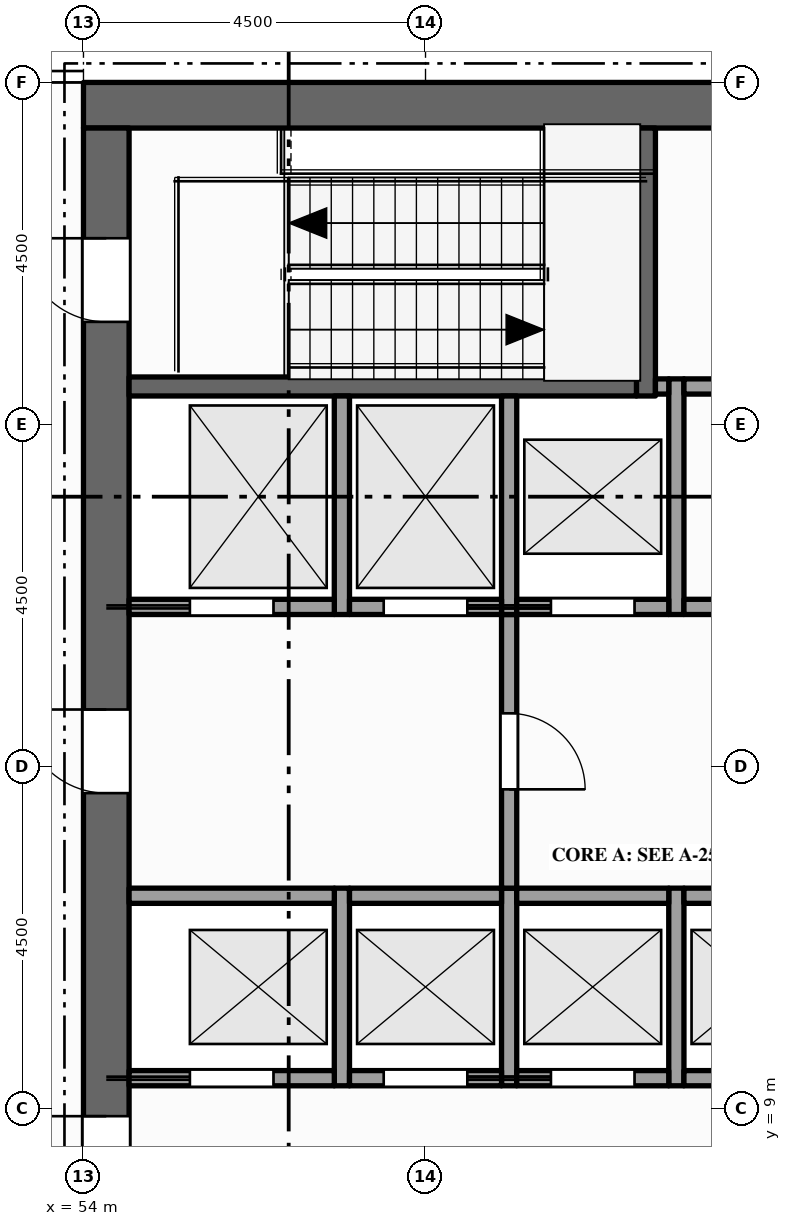
"""IFC4 building model, lengths in metres.
Left out: names, types, materials, properties, quantities, classifications, styles, units other than length and angle.
Written with IfcOpenShell. Run it as: python <this file> out.ifc"""

import sys

from ifc_helpers import new_model, si_unit, direction, frame, frame_2d, origin, place, context, subcontext, project, spatial, rectangle, extrude, element, fill, save


model = new_model("IFC4")
c1 = context("Model", 3, precision=1e-05, world=origin(), true_north=direction((0.0, 1.0)))
c2 = subcontext(c1, "Body", "Model", "MODEL_VIEW")
j1 = project(units=[si_unit("LENGTHUNIT", "METRE"), si_unit("PLANEANGLEUNIT", "RADIAN")], contexts=[c1])
p1 = place(None, origin())
s1 = spatial("IfcSite", under=j1, at=p1, CompositionType="ELEMENT")
p2 = place(p1, origin())
s2 = spatial("IfcBuilding", under=s1, at=p2, CompositionType="ELEMENT")
p3 = place(p2, frame((0.0, 0.0, 323.0)))
s3 = spatial("IfcBuildingStorey", under=s2, at=p3, CompositionType="ELEMENT", Elevation=323.0)
p4 = place(p3, frame((54.0, 22.2, -0.15), z_axis=(0.0, 0.0, 1.0), x_axis=(1.0, 0.0, 0.0)))
e1 = element("IfcWall", 1, at=p4, inside=s3, PredefinedType="SHEAR", context=c2, shape_type="SweptSolid", body=[
    extrude(rectangle(XDim=13.5, YDim=0.6, at=frame_2d((6.75, 0.0))), origin(), (0.0, 0.0, 1.0), 4.5),
])
p5 = place(p3, frame((54.3, 0.6, -0.15), z_axis=(0.0, 0.0, 1.0), x_axis=(0.0, 1.0, 0.0)))
e2 = element("IfcWall", 2, at=p5, inside=s3, PredefinedType="SHEAR", context=c2, shape_type="SweptSolid", body=[
    extrude(rectangle(XDim=21.3, YDim=0.6, at=frame_2d((10.65, 0.0))), origin(), (0.0, 0.0, 1.0), 4.5),
])
p6 = place(p5, frame((6.5, 0.0, 0.15)))
e3 = element("IfcOpeningElement", 3, at=p6, cuts=e2, PredefinedType="OPENING", context=c2, shape_type="SweptSolid", body=[
    extrude(rectangle(XDim=1.8, YDim=2.1, at=frame_2d((0.9, 1.05))), frame((0.0, 0.31, 0.0), z_axis=(0.0, -1.0, 0.0), x_axis=(1.0, 0.0, 0.0)), (0.0, 0.0, 1.0), 0.62),
])
p7 = place(p5, frame((12.55, 0.0, 0.15)))
e4 = element("IfcOpeningElement", 4, at=p7, cuts=e2, PredefinedType="OPENING", context=c2, shape_type="SweptSolid", body=[
    extrude(rectangle(XDim=1.1, YDim=2.1, at=frame_2d((0.55, 1.05))), frame((0.0, 0.31, 0.0), z_axis=(0.0, -1.0, 0.0), x_axis=(1.0, 0.0, 0.0)), (0.0, 0.0, 1.0), 0.62),
])
p8 = place(p5, frame((1.55, 0.0, 0.15)))
e5 = element("IfcOpeningElement", 5, at=p8, cuts=e2, PredefinedType="OPENING", context=c2, shape_type="SweptSolid", body=[
    extrude(rectangle(XDim=1.1, YDim=2.1, at=frame_2d((0.55, 1.05))), frame((0.0, 0.31, 0.0), z_axis=(0.0, -1.0, 0.0), x_axis=(1.0, 0.0, 0.0)), (0.0, 0.0, 1.0), 0.62),
])
p9 = place(p5, frame((18.75, 0.0, 0.15)))
e6 = element("IfcOpeningElement", 6, at=p9, cuts=e2, PredefinedType="OPENING", context=c2, shape_type="SweptSolid", body=[
    extrude(rectangle(XDim=1.1, YDim=2.1, at=frame_2d((0.55, 1.05))), frame((0.0, 0.31, 0.0), z_axis=(0.0, -1.0, 0.0), x_axis=(1.0, 0.0, 0.0)), (0.0, 0.0, 1.0), 0.62),
])
p10 = place(p3, frame((57.4, 9.3, 0.0), z_axis=(0.0, 0.0, 1.0), x_axis=(0.0, 1.0, 0.0)))
e7 = element("IfcWall", 7, at=p10, inside=s3, PredefinedType="SOLIDWALL", context=c2, shape_type="SweptSolid", body=[
    extrude(rectangle(XDim=2.6, YDim=0.2, at=frame_2d((1.3, 0.0))), origin(), (0.0, 0.0, 1.0), 4.35),
])
p11 = place(p3, frame((57.4, 15.5, 0.0), z_axis=(0.0, 0.0, 1.0), x_axis=(0.0, 1.0, 0.0)))
e8 = element("IfcWall", 8, at=p11, inside=s3, PredefinedType="SOLIDWALL", context=c2, shape_type="SweptSolid", body=[
    extrude(rectangle(XDim=2.875, YDim=0.2, at=frame_2d((1.438, 0.0))), origin(), (0.0, 0.0, 1.0), 4.35),
])
p12 = place(p3, frame((59.6, 9.3, 0.0), z_axis=(0.0, 0.0, 1.0), x_axis=(0.0, 1.0, 0.0)))
e9 = element("IfcWall", 9, at=p12, inside=s3, PredefinedType="SOLIDWALL", context=c2, shape_type="SweptSolid", body=[
    extrude(rectangle(XDim=2.6, YDim=0.2, at=frame_2d((1.3, 0.0))), origin(), (0.0, 0.0, 1.0), 4.35),
])
p13 = place(p3, frame((59.6, 11.9, 0.0), z_axis=(0.0, 0.0, 1.0), x_axis=(0.0, 1.0, 0.0)))
e10 = element("IfcWall", 10, at=p13, inside=s3, PredefinedType="PARTITIONING", context=c2, shape_type="SweptSolid", body=[
    extrude(rectangle(XDim=3.6, YDim=0.2, at=frame_2d((1.8, 0.0))), origin(), (0.0, 0.0, 1.0), 4.35),
])
p14 = place(p13, frame((1.3, 0.0, 0.0)))
e11 = element("IfcOpeningElement", 11, at=p14, cuts=e10, PredefinedType="OPENING", context=c2, shape_type="SweptSolid", body=[
    extrude(rectangle(XDim=1.0, YDim=2.1, at=frame_2d((0.5, 1.05))), frame((0.0, 0.11, 0.0), z_axis=(0.0, -1.0, 0.0), x_axis=(1.0, 0.0, 0.0)), (0.0, 0.0, 1.0), 0.22),
])
p15 = place(p3, frame((59.6, 15.5, 0.0), z_axis=(0.0, 0.0, 1.0), x_axis=(0.0, 1.0, 0.0)))
e12 = element("IfcWall", 12, at=p15, inside=s3, PredefinedType="SOLIDWALL", context=c2, shape_type="SweptSolid", body=[
    extrude(rectangle(XDim=2.875, YDim=0.2, at=frame_2d((1.438, 0.0))), origin(), (0.0, 0.0, 1.0), 4.35),
])
p16 = place(p3, frame((61.4, 18.375, 0.0), z_axis=(0.0, 0.0, 1.0), x_axis=(0.0, 1.0, 0.0)))
e13 = element("IfcWall", 13, at=p16, inside=s3, PredefinedType="SHEAR", context=c2, shape_type="SweptSolid", body=[
    extrude(rectangle(XDim=3.525, YDim=0.25, at=frame_2d((1.762, 0.0))), origin(), (0.0, 0.0, 1.0), 4.35),
])
p17 = place(p3, frame((61.8, 9.3, 0.0), z_axis=(0.0, 0.0, 1.0), x_axis=(0.0, 1.0, 0.0)))
e14 = element("IfcWall", 14, at=p17, inside=s3, PredefinedType="SOLIDWALL", context=c2, shape_type="SweptSolid", body=[
    extrude(rectangle(XDim=2.6, YDim=0.2, at=frame_2d((1.3, 0.0))), origin(), (0.0, 0.0, 1.0), 4.35),
])
p18 = place(p3, frame((61.8, 15.5, 0.0), z_axis=(0.0, 0.0, 1.0), x_axis=(0.0, 1.0, 0.0)))
e15 = element("IfcWall", 15, at=p18, inside=s3, PredefinedType="SOLIDWALL", context=c2, shape_type="SweptSolid", body=[
    extrude(rectangle(XDim=3.1, YDim=0.2, at=frame_2d((1.55, 0.0))), origin(), (0.0, 0.0, 1.0), 4.35),
])
p19 = place(p3, frame((54.6, 9.4, 0.0), z_axis=(0.0, 0.0, 1.0), x_axis=(1.0, 0.0, 0.0)))
e16 = element("IfcWall", 16, at=p19, inside=s3, PredefinedType="SOLIDWALL", context=c2, shape_type="SweptSolid", body=[
    extrude(rectangle(XDim=2.7, YDim=0.2, at=frame_2d((1.35, 0.0))), origin(), (0.0, 0.0, 1.0), 4.35),
])
p20 = place(p19, frame((0.8, 0.0, 0.012)))
e17 = element("IfcOpeningElement", 17, at=p20, cuts=e16, PredefinedType="OPENING", context=c2, shape_type="SweptSolid", body=[
    extrude(rectangle(XDim=1.1, YDim=2.1, at=frame_2d((0.55, 1.05))), frame((0.0, 0.11, 0.0), z_axis=(0.0, -1.0, 0.0), x_axis=(1.0, 0.0, 0.0)), (0.0, 0.0, 1.0), 0.22),
])
p21 = place(p3, frame((57.5, 9.4, 0.0), z_axis=(0.0, 0.0, 1.0), x_axis=(1.0, 0.0, 0.0)))
e18 = element("IfcWall", 18, at=p21, inside=s3, PredefinedType="SOLIDWALL", context=c2, shape_type="SweptSolid", body=[
    extrude(rectangle(XDim=2.0, YDim=0.2, at=frame_2d((1.0, 0.0))), origin(), (0.0, 0.0, 1.0), 4.35),
])
p22 = place(p21, frame((0.45, 0.0, 0.012)))
e19 = element("IfcOpeningElement", 19, at=p22, cuts=e18, PredefinedType="OPENING", context=c2, shape_type="SweptSolid", body=[
    extrude(rectangle(XDim=1.1, YDim=2.1, at=frame_2d((0.55, 1.05))), frame((0.0, 0.11, 0.0), z_axis=(0.0, -1.0, 0.0), x_axis=(1.0, 0.0, 0.0)), (0.0, 0.0, 1.0), 0.22),
])
p23 = place(p3, frame((59.7, 9.4, 0.0), z_axis=(0.0, 0.0, 1.0), x_axis=(1.0, 0.0, 0.0)))
e20 = element("IfcWall", 20, at=p23, inside=s3, PredefinedType="SOLIDWALL", context=c2, shape_type="SweptSolid", body=[
    extrude(rectangle(XDim=2.0, YDim=0.2, at=frame_2d((1.0, 0.0))), origin(), (0.0, 0.0, 1.0), 4.35),
])
p24 = place(p23, frame((0.45, 0.0, 0.012)))
e21 = element("IfcOpeningElement", 21, at=p24, cuts=e20, PredefinedType="OPENING", context=c2, shape_type="SweptSolid", body=[
    extrude(rectangle(XDim=1.1, YDim=2.1, at=frame_2d((0.55, 1.05))), frame((0.0, 0.11, 0.0), z_axis=(0.0, -1.0, 0.0), x_axis=(1.0, 0.0, 0.0)), (0.0, 0.0, 1.0), 0.22),
])
p25 = place(p3, frame((61.9, 9.4, 0.0), z_axis=(0.0, 0.0, 1.0), x_axis=(1.0, 0.0, 0.0)))
e22 = element("IfcWall", 22, at=p25, inside=s3, PredefinedType="SOLIDWALL", context=c2, shape_type="SweptSolid", body=[
    extrude(rectangle(XDim=1.95, YDim=0.2, at=frame_2d((0.975, 0.0))), origin(), (0.0, 0.0, 1.0), 4.35),
])
p26 = place(p25, frame((0.425, 0.0, 0.012)))
e23 = element("IfcOpeningElement", 23, at=p26, cuts=e22, PredefinedType="OPENING", context=c2, shape_type="SweptSolid", body=[
    extrude(rectangle(XDim=1.1, YDim=2.1, at=frame_2d((0.55, 1.05))), frame((0.0, 0.11, 0.0), z_axis=(0.0, -1.0, 0.0), x_axis=(1.0, 0.0, 0.0)), (0.0, 0.0, 1.0), 0.22),
])
p27 = place(p3, frame((54.6, 11.8, 0.0), z_axis=(0.0, 0.0, 1.0), x_axis=(1.0, 0.0, 0.0)))
e24 = element("IfcWall", 24, at=p27, inside=s3, PredefinedType="SOLIDWALL", context=c2, shape_type="SweptSolid", body=[
    extrude(rectangle(XDim=2.7, YDim=0.2, at=frame_2d((1.35, 0.0))), origin(), (0.0, 0.0, 1.0), 4.35),
])
for number, where, z_axis, x_axis in (
    (25, (57.5, 11.8, 0.0), (0.0, 0.0, 1.0), (1.0, 0.0, 0.0)),
    (26, (59.7, 11.8, 0.0), (0.0, 0.0, 1.0), (1.0, 0.0, 0.0)),
):
    element("IfcWall", number, at=place(p3, frame(where, z_axis=z_axis, x_axis=x_axis)), inside=s3, PredefinedType="SOLIDWALL", context=c2, shape_type="SweptSolid", body=[
        extrude(rectangle(XDim=2.0, YDim=0.2, at=frame_2d((1.0, 0.0))), origin(), (0.0, 0.0, 1.0), 4.35),
    ])
p28 = place(p3, frame((61.9, 11.8, 0.0), z_axis=(0.0, 0.0, 1.0), x_axis=(1.0, 0.0, 0.0)))
e27 = element("IfcWall", 27, at=p28, inside=s3, PredefinedType="SOLIDWALL", context=c2, shape_type="SweptSolid", body=[
    extrude(rectangle(XDim=1.95, YDim=0.2, at=frame_2d((0.975, 0.0))), origin(), (0.0, 0.0, 1.0), 4.35),
])
p29 = place(p3, frame((54.6, 15.6, 0.0), z_axis=(0.0, 0.0, 1.0), x_axis=(1.0, 0.0, 0.0)))
e28 = element("IfcWall", 28, at=p29, inside=s3, PredefinedType="SOLIDWALL", context=c2, shape_type="SweptSolid", body=[
    extrude(rectangle(XDim=2.7, YDim=0.2, at=frame_2d((1.35, 0.0))), origin(), (0.0, 0.0, 1.0), 4.35),
])
p30 = place(p29, frame((0.8, 0.0, 0.012)))
e29 = element("IfcOpeningElement", 29, at=p30, cuts=e28, PredefinedType="OPENING", context=c2, shape_type="SweptSolid", body=[
    extrude(rectangle(XDim=1.1, YDim=2.1, at=frame_2d((0.55, 1.05))), frame((0.0, 0.11, 0.0), z_axis=(0.0, -1.0, 0.0), x_axis=(1.0, 0.0, 0.0)), (0.0, 0.0, 1.0), 0.22),
])
p31 = place(p3, frame((57.5, 15.6, 0.0), z_axis=(0.0, 0.0, 1.0), x_axis=(1.0, 0.0, 0.0)))
e30 = element("IfcWall", 30, at=p31, inside=s3, PredefinedType="SOLIDWALL", context=c2, shape_type="SweptSolid", body=[
    extrude(rectangle(XDim=2.0, YDim=0.2, at=frame_2d((1.0, 0.0))), origin(), (0.0, 0.0, 1.0), 4.35),
])
p32 = place(p31, frame((0.45, 0.0, 0.012)))
e31 = element("IfcOpeningElement", 31, at=p32, cuts=e30, PredefinedType="OPENING", context=c2, shape_type="SweptSolid", body=[
    extrude(rectangle(XDim=1.1, YDim=2.1, at=frame_2d((0.55, 1.05))), frame((0.0, 0.11, 0.0), z_axis=(0.0, -1.0, 0.0), x_axis=(1.0, 0.0, 0.0)), (0.0, 0.0, 1.0), 0.22),
])
p33 = place(p3, frame((59.7, 15.6, 0.0), z_axis=(0.0, 0.0, 1.0), x_axis=(1.0, 0.0, 0.0)))
e32 = element("IfcWall", 32, at=p33, inside=s3, PredefinedType="SOLIDWALL", context=c2, shape_type="SweptSolid", body=[
    extrude(rectangle(XDim=2.0, YDim=0.2, at=frame_2d((1.0, 0.0))), origin(), (0.0, 0.0, 1.0), 4.35),
])
p34 = place(p33, frame((0.45, 0.0, 0.012)))
e33 = element("IfcOpeningElement", 33, at=p34, cuts=e32, PredefinedType="OPENING", context=c2, shape_type="SweptSolid", body=[
    extrude(rectangle(XDim=1.1, YDim=2.1, at=frame_2d((0.55, 1.05))), frame((0.0, 0.11, 0.0), z_axis=(0.0, -1.0, 0.0), x_axis=(1.0, 0.0, 0.0)), (0.0, 0.0, 1.0), 0.22),
])
p35 = place(p3, frame((61.9, 15.6, 0.0), z_axis=(0.0, 0.0, 1.0), x_axis=(1.0, 0.0, 0.0)))
e34 = element("IfcWall", 34, at=p35, inside=s3, PredefinedType="PARTITIONING", context=c2, shape_type="SweptSolid", body=[
    extrude(rectangle(XDim=1.95, YDim=0.2, at=frame_2d((0.975, 0.0))), origin(), (0.0, 0.0, 1.0), 4.35),
])
p36 = place(p35, frame((0.525, 0.0, 0.0)))
e35 = element("IfcOpeningElement", 35, at=p36, cuts=e34, PredefinedType="OPENING", context=c2, shape_type="SweptSolid", body=[
    extrude(rectangle(XDim=0.9, YDim=2.1, at=frame_2d((0.45, 1.05))), frame((0.0, 0.11, 0.0), z_axis=(0.0, -1.0, 0.0), x_axis=(1.0, 0.0, 0.0)), (0.0, 0.0, 1.0), 0.22),
])
p37 = place(p3, frame((54.6, 18.5, 0.0), z_axis=(0.0, 0.0, 1.0), x_axis=(1.0, 0.0, 0.0)))
e36 = element("IfcWall", 36, at=p37, inside=s3, PredefinedType="SHEAR", context=c2, shape_type="SweptSolid", body=[
    extrude(rectangle(XDim=6.675, YDim=0.25, at=frame_2d((3.337, 0.0))), origin(), (0.0, 0.0, 1.0), 4.35),
])
p38 = place(p3, frame((61.525, 18.5, 0.0), z_axis=(0.0, 0.0, 1.0), x_axis=(1.0, 0.0, 0.0)))
e37 = element("IfcWall", 37, at=p38, inside=s3, PredefinedType="SOLIDWALL", context=c2, shape_type="SweptSolid", body=[
    extrude(rectangle(XDim=0.175, YDim=0.2, at=frame_2d((0.087, 0.0))), origin(), (0.0, 0.0, 1.0), 4.35),
])
p39 = place(p3, frame((61.9, 18.5, 0.0), z_axis=(0.0, 0.0, 1.0), x_axis=(1.0, 0.0, 0.0)))
e38 = element("IfcWall", 38, at=p39, inside=s3, PredefinedType="PARTITIONING", context=c2, shape_type="SweptSolid", body=[
    extrude(rectangle(XDim=1.95, YDim=0.2, at=frame_2d((0.975, 0.0))), origin(), (0.0, 0.0, 1.0), 4.35),
])
p40 = place(p20, origin())
e39 = element("IfcDoor", 39, at=p40, inside=s3, OperationType="SLIDING_TO_LEFT", PredefinedType="DOOR", context=c2, shape_type="SweptSolid", body=[
    extrude(rectangle(XDim=1.1, YDim=2.1, at=frame_2d((0.55, 1.05))), frame((0.0, 0.025, 0.0), z_axis=(0.0, -1.0, 0.0), x_axis=(1.0, 0.0, 0.0)), (0.0, 0.0, 1.0), 0.05),
])
fill(e17, e39)
p41 = place(p22, origin())
e40 = element("IfcDoor", 40, at=p41, inside=s3, OperationType="SLIDING_TO_RIGHT", PredefinedType="DOOR", context=c2, shape_type="SweptSolid", body=[
    extrude(rectangle(XDim=1.1, YDim=2.1, at=frame_2d((0.55, 1.05))), frame((0.0, 0.025, 0.0), z_axis=(0.0, -1.0, 0.0), x_axis=(1.0, 0.0, 0.0)), (0.0, 0.0, 1.0), 0.05),
])
fill(e19, e40)
p42 = place(p24, origin())
e41 = element("IfcDoor", 41, at=p42, inside=s3, OperationType="SLIDING_TO_LEFT", PredefinedType="DOOR", context=c2, shape_type="SweptSolid", body=[
    extrude(rectangle(XDim=1.1, YDim=2.1, at=frame_2d((0.55, 1.05))), frame((0.0, 0.025, 0.0), z_axis=(0.0, -1.0, 0.0), x_axis=(1.0, 0.0, 0.0)), (0.0, 0.0, 1.0), 0.05),
])
fill(e21, e41)
p43 = place(p30, origin())
e42 = element("IfcDoor", 42, at=p43, inside=s3, OperationType="SLIDING_TO_LEFT", PredefinedType="DOOR", context=c2, shape_type="SweptSolid", body=[
    extrude(rectangle(XDim=1.1, YDim=2.1, at=frame_2d((0.55, 1.05))), frame((0.0, 0.025, 0.0), z_axis=(0.0, -1.0, 0.0), x_axis=(1.0, 0.0, 0.0)), (0.0, 0.0, 1.0), 0.05),
])
fill(e29, e42)
p44 = place(p32, origin())
e43 = element("IfcDoor", 43, at=p44, inside=s3, OperationType="SLIDING_TO_RIGHT", PredefinedType="DOOR", context=c2, shape_type="SweptSolid", body=[
    extrude(rectangle(XDim=1.1, YDim=2.1, at=frame_2d((0.55, 1.05))), frame((0.0, 0.025, 0.0), z_axis=(0.0, -1.0, 0.0), x_axis=(1.0, 0.0, 0.0)), (0.0, 0.0, 1.0), 0.05),
])
fill(e31, e43)
p45 = place(p34, origin())
e44 = element("IfcDoor", 44, at=p45, inside=s3, OperationType="SLIDING_TO_LEFT", PredefinedType="DOOR", context=c2, shape_type="SweptSolid", body=[
    extrude(rectangle(XDim=1.1, YDim=2.1, at=frame_2d((0.55, 1.05))), frame((0.0, 0.025, 0.0), z_axis=(0.0, -1.0, 0.0), x_axis=(1.0, 0.0, 0.0)), (0.0, 0.0, 1.0), 0.05),
])
fill(e33, e44)
p46 = place(p6, origin())
e45 = element("IfcDoor", 45, at=p46, inside=s3, OperationType="DOUBLE_DOOR_SINGLE_SWING", PredefinedType="DOOR", context=c2, shape_type="SweptSolid", body=[
    extrude(rectangle(XDim=1.8, YDim=2.1, at=frame_2d((0.9, 1.05))), frame((0.0, 0.025, 0.0), z_axis=(0.0, -1.0, 0.0), x_axis=(1.0, 0.0, 0.0)), (0.0, 0.0, 1.0), 0.05),
])
fill(e3, e45)
p47 = place(p7, origin())
e46 = element("IfcDoor", 46, at=p47, inside=s3, OperationType="SINGLE_SWING_RIGHT", PredefinedType="DOOR", context=c2, shape_type="SweptSolid", body=[
    extrude(rectangle(XDim=1.1, YDim=2.1, at=frame_2d((0.55, 1.05))), frame((0.0, 0.025, 0.0), z_axis=(0.0, -1.0, 0.0), x_axis=(1.0, 0.0, 0.0)), (0.0, 0.0, 1.0), 0.05),
])
fill(e4, e46)
p48 = place(p14, origin())
e47 = element("IfcDoor", 47, at=p48, inside=s3, OperationType="SINGLE_SWING_LEFT", PredefinedType="DOOR", context=c2, shape_type="SweptSolid", body=[
    extrude(rectangle(XDim=1.0, YDim=2.1, at=frame_2d((0.5, 1.05))), frame((0.0, 0.025, 0.0), z_axis=(0.0, -1.0, 0.0), x_axis=(1.0, 0.0, 0.0)), (0.0, 0.0, 1.0), 0.05),
])
fill(e11, e47)
p49 = place(p9, origin())
e48 = element("IfcDoor", 48, at=p49, inside=s3, OperationType="SINGLE_SWING_RIGHT", PredefinedType="DOOR", context=c2, shape_type="SweptSolid", body=[
    extrude(rectangle(XDim=1.1, YDim=2.1, at=frame_2d((0.55, 1.05))), frame((0.0, 0.025, 0.0), z_axis=(0.0, -1.0, 0.0), x_axis=(1.0, 0.0, 0.0)), (0.0, 0.0, 1.0), 0.05),
])
fill(e6, e48)
save(model, sys.argv[1])
